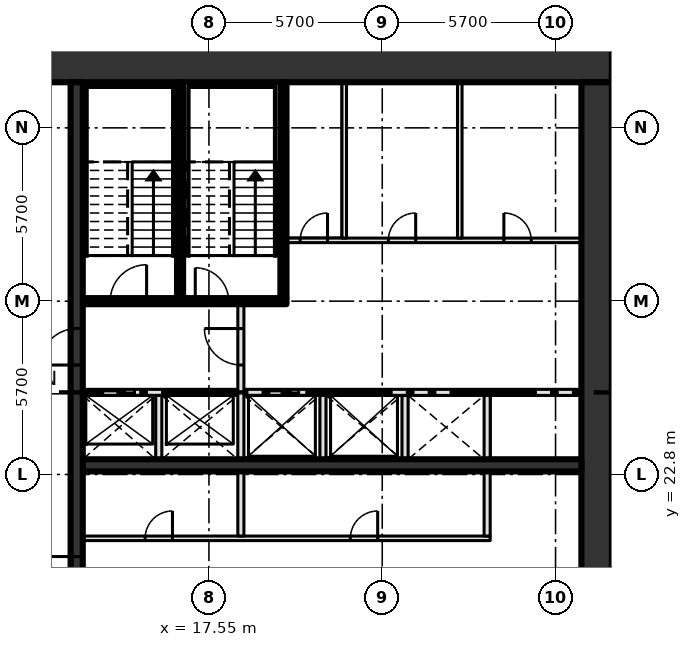
"""IFC4 building model, lengths in metres.
Left out: names, types, materials, properties, quantities, classifications, styles, units other than length and angle.
Written with IfcOpenShell. Run it as: python <this file> out.ifc"""

import sys

from ifc_helpers import new_model, si_unit, direction, frame, frame_2d, origin, place, context, subcontext, project, spatial, rectangle, extrude, element, fill, save


model = new_model("IFC4")
c1 = context("Model", 3, precision=1e-05, world=origin(), true_north=direction((0.0, 1.0)))
c2 = subcontext(c1, "Body", "Model", "MODEL_VIEW")
j1 = project(units=[si_unit("LENGTHUNIT", "METRE"), si_unit("PLANEANGLEUNIT", "RADIAN")], contexts=[c1])
p1 = place(None, origin())
s1 = spatial("IfcSite", under=j1, at=p1, CompositionType="ELEMENT")
p2 = place(p1, origin())
s2 = spatial("IfcBuilding", under=s1, at=p2, CompositionType="ELEMENT")
p3 = place(p2, frame((0.0, 0.0, 33.0)))
s3 = spatial("IfcBuildingStorey", under=s2, at=p3, CompositionType="ELEMENT", Elevation=33.0)
p4 = place(p3, frame((8.0, 36.3, -0.45), z_axis=(0.0, 0.0, 1.0), x_axis=(1.0, 0.0, 0.0)))
e1 = element("IfcWall", 1, at=p4, inside=s3, PredefinedType="SHEAR", context=c2, shape_type="SweptSolid", body=[
    extrude(rectangle(XDim=22.8, YDim=1.2, at=frame_2d((11.4, 0.0))), origin(), (0.0, 0.0, 1.0), 4.35),
])
p5 = place(p4, frame((2.3, 0.0, 0.45)))
e2 = element("IfcOpeningElement", 2, at=p5, cuts=e1, PredefinedType="OPENING", context=c2, shape_type="SweptSolid", body=[
    extrude(rectangle(XDim=1.8, YDim=2.1, at=frame_2d((0.9, 1.05))), frame((0.0, 0.61, 0.0), z_axis=(0.0, -1.0, 0.0), x_axis=(1.0, 0.0, 0.0)), (0.0, 0.0, 1.0), 1.22),
])
p6 = place(p3, frame((30.3, 15.1, -0.45), z_axis=(0.0, 0.0, 1.0), x_axis=(0.0, 1.0, 0.0)))
e3 = element("IfcWall", 3, at=p6, inside=s3, PredefinedType="SHEAR", context=c2, shape_type="SweptSolid", body=[
    extrude(rectangle(XDim=20.6, YDim=1.0, at=frame_2d((10.3, 0.0))), origin(), (0.0, 0.0, 1.0), 4.35),
])
p7 = place(p3, frame((13.4, 20.7, 0.0), z_axis=(0.0, 0.0, 1.0), x_axis=(1.0, 0.0, 0.0)))
e4 = element("IfcWall", 4, at=p7, inside=s3, PredefinedType="PARTITIONING", context=c2, shape_type="SweptSolid", body=[
    extrude(rectangle(XDim=13.4, YDim=0.15, at=frame_2d((6.7, 0.0))), origin(), (0.0, 0.0, 1.0), 3.9),
])
p8 = place(p7, frame((2.05, 0.0, 0.0)))
e5 = element("IfcOpeningElement", 5, at=p8, cuts=e4, PredefinedType="OPENING", context=c2, shape_type="SweptSolid", body=[
    extrude(rectangle(XDim=0.9, YDim=2.1, at=frame_2d((0.45, 1.05))), frame((0.0, 0.085, 0.0), z_axis=(0.0, -1.0, 0.0), x_axis=(1.0, 0.0, 0.0)), (0.0, 0.0, 1.0), 0.17),
])
p9 = place(p7, frame((8.8, 0.0, 0.0)))
e6 = element("IfcOpeningElement", 6, at=p9, cuts=e4, PredefinedType="OPENING", context=c2, shape_type="SweptSolid", body=[
    extrude(rectangle(XDim=0.9, YDim=2.1, at=frame_2d((0.45, 1.05))), frame((0.0, 0.085, 0.0), z_axis=(0.0, -1.0, 0.0), x_axis=(1.0, 0.0, 0.0)), (0.0, 0.0, 1.0), 0.17),
])
p10 = place(p3, frame((13.4, 23.1, 0.0), z_axis=(0.0, 0.0, 1.0), x_axis=(1.0, 0.0, 0.0)))
e7 = element("IfcWall", 7, at=p10, inside=s3, PredefinedType="SHEAR", context=c2, shape_type="SweptSolid", body=[
    extrude(rectangle(XDim=16.4, YDim=0.4, at=frame_2d((8.2, 0.0))), origin(), (0.0, 0.0, 1.0), 3.9),
])
p11 = place(p3, frame((13.4, 25.5, 0.0), z_axis=(0.0, 0.0, 1.0), x_axis=(1.0, 0.0, 0.0)))
e8 = element("IfcWall", 8, at=p11, inside=s3, PredefinedType="SOLIDWALL", context=c2, shape_type="SweptSolid", body=[
    extrude(rectangle(XDim=16.4, YDim=0.2, at=frame_2d((8.2, 0.0))), origin(), (0.0, 0.0, 1.0), 3.9),
])
p12 = place(p11, frame((0.6, 0.0, 0.0)))
e9 = element("IfcOpeningElement", 9, at=p12, cuts=e8, PredefinedType="OPENING", context=c2, shape_type="SweptSolid", body=[
    extrude(rectangle(XDim=1.1, YDim=2.1, at=frame_2d((0.55, 1.05))), frame((0.0, 0.11, 0.0), z_axis=(0.0, -1.0, 0.0), x_axis=(1.0, 0.0, 0.0)), (0.0, 0.0, 1.0), 0.22),
])
p13 = place(p11, frame((3.3, 0.0, 0.0)))
e10 = element("IfcOpeningElement", 10, at=p13, cuts=e8, PredefinedType="OPENING", context=c2, shape_type="SweptSolid", body=[
    extrude(rectangle(XDim=1.1, YDim=2.1, at=frame_2d((0.55, 1.05))), frame((0.0, 0.11, 0.0), z_axis=(0.0, -1.0, 0.0), x_axis=(1.0, 0.0, 0.0)), (0.0, 0.0, 1.0), 0.22),
])
p14 = place(p11, frame((6.0, 0.0, 0.0)))
e11 = element("IfcOpeningElement", 11, at=p14, cuts=e8, PredefinedType="OPENING", context=c2, shape_type="SweptSolid", body=[
    extrude(rectangle(XDim=1.1, YDim=2.1, at=frame_2d((0.55, 1.05))), frame((0.0, 0.11, 0.0), z_axis=(0.0, -1.0, 0.0), x_axis=(1.0, 0.0, 0.0)), (0.0, 0.0, 1.0), 0.22),
])
p15 = place(p11, frame((8.7, 0.0, 0.0)))
e12 = element("IfcOpeningElement", 12, at=p15, cuts=e8, PredefinedType="OPENING", context=c2, shape_type="SweptSolid", body=[
    extrude(rectangle(XDim=1.1, YDim=2.1, at=frame_2d((0.55, 1.05))), frame((0.0, 0.11, 0.0), z_axis=(0.0, -1.0, 0.0), x_axis=(1.0, 0.0, 0.0)), (0.0, 0.0, 1.0), 0.22),
])
p16 = place(p3, frame((13.4, 28.5, 0.0), z_axis=(0.0, 0.0, 1.0), x_axis=(1.0, 0.0, 0.0)))
e13 = element("IfcWall", 13, at=p16, inside=s3, PredefinedType="SOLIDWALL", context=c2, shape_type="SweptSolid", body=[
    extrude(rectangle(XDim=6.7, YDim=0.2, at=frame_2d((3.35, 0.0))), origin(), (0.0, 0.0, 1.0), 3.9),
])
p17 = place(p16, frame((0.9, 0.0, 0.0)))
e14 = element("IfcOpeningElement", 14, at=p17, cuts=e13, PredefinedType="OPENING", context=c2, shape_type="SweptSolid", body=[
    extrude(rectangle(XDim=1.2, YDim=2.1, at=frame_2d((0.6, 1.05))), frame((0.0, 0.11, 0.0), z_axis=(0.0, -1.0, 0.0), x_axis=(1.0, 0.0, 0.0)), (0.0, 0.0, 1.0), 0.22),
])
p18 = place(p16, frame((3.7, 0.0, 0.0)))
e15 = element("IfcOpeningElement", 15, at=p18, cuts=e13, PredefinedType="OPENING", context=c2, shape_type="SweptSolid", body=[
    extrude(rectangle(XDim=1.1, YDim=2.1, at=frame_2d((0.55, 1.05))), frame((0.0, 0.11, 0.0), z_axis=(0.0, -1.0, 0.0), x_axis=(1.0, 0.0, 0.0)), (0.0, 0.0, 1.0), 0.22),
])
p19 = place(p3, frame((20.1, 30.5, 0.0), z_axis=(0.0, 0.0, 1.0), x_axis=(1.0, 0.0, 0.0)))
e16 = element("IfcWall", 16, at=p19, inside=s3, PredefinedType="PARTITIONING", context=c2, shape_type="SweptSolid", body=[
    extrude(rectangle(XDim=9.7, YDim=0.15, at=frame_2d((4.85, 0.0))), origin(), (0.0, 0.0, 1.0), 3.9),
])
p20 = place(p19, frame((0.45, 0.0, 0.0)))
e17 = element("IfcOpeningElement", 17, at=p20, cuts=e16, PredefinedType="OPENING", context=c2, shape_type="SweptSolid", body=[
    extrude(rectangle(XDim=0.9, YDim=2.1, at=frame_2d((0.45, 1.05))), frame((0.0, 0.085, 0.0), z_axis=(0.0, -1.0, 0.0), x_axis=(1.0, 0.0, 0.0)), (0.0, 0.0, 1.0), 0.17),
])
p21 = place(p19, frame((3.35, 0.0, 0.0)))
e18 = element("IfcOpeningElement", 18, at=p21, cuts=e16, PredefinedType="OPENING", context=c2, shape_type="SweptSolid", body=[
    extrude(rectangle(XDim=0.9, YDim=2.1, at=frame_2d((0.45, 1.05))), frame((0.0, 0.085, 0.0), z_axis=(0.0, -1.0, 0.0), x_axis=(1.0, 0.0, 0.0)), (0.0, 0.0, 1.0), 0.17),
])
p22 = place(p19, frame((7.15, 0.0, 0.0)))
e19 = element("IfcOpeningElement", 19, at=p22, cuts=e16, PredefinedType="OPENING", context=c2, shape_type="SweptSolid", body=[
    extrude(rectangle(XDim=0.9, YDim=2.1, at=frame_2d((0.45, 1.05))), frame((0.0, 0.085, 0.0), z_axis=(0.0, -1.0, 0.0), x_axis=(1.0, 0.0, 0.0)), (0.0, 0.0, 1.0), 0.17),
])
p23 = place(p3, frame((13.2, 15.1, 0.0), z_axis=(0.0, 0.0, 1.0), x_axis=(0.0, 1.0, 0.0)))
e20 = element("IfcWall", 20, at=p23, inside=s3, PredefinedType="SHEAR", context=c2, shape_type="SweptSolid", body=[
    extrude(rectangle(XDim=20.6, YDim=0.4, at=frame_2d((10.3, 0.0))), origin(), (0.0, 0.0, 1.0), 3.9),
])
p24 = place(p23, frame((3.2, 0.0, 0.0)))
e21 = element("IfcOpeningElement", 21, at=p24, cuts=e20, PredefinedType="OPENING", context=c2, shape_type="SweptSolid", body=[
    extrude(rectangle(XDim=1.8, YDim=2.1, at=frame_2d((0.9, 1.05))), frame((0.0, 0.21, 0.0), z_axis=(0.0, -1.0, 0.0), x_axis=(1.0, 0.0, 0.0)), (0.0, 0.0, 1.0), 0.42),
])
p25 = place(p23, frame((11.3, 0.0, 0.0)))
e22 = element("IfcOpeningElement", 22, at=p25, cuts=e20, PredefinedType="OPENING", context=c2, shape_type="SweptSolid", body=[
    extrude(rectangle(XDim=1.2, YDim=2.1, at=frame_2d((0.6, 1.05))), frame((0.0, 0.21, 0.0), z_axis=(0.0, -1.0, 0.0), x_axis=(1.0, 0.0, 0.0)), (0.0, 0.0, 1.0), 0.42),
])
p26 = place(p3, frame((15.9, 23.3, 0.0), z_axis=(0.0, 0.0, 1.0), x_axis=(0.0, 1.0, 0.0)))
e23 = element("IfcWall", 23, at=p26, inside=s3, PredefinedType="SOLIDWALL", context=c2, shape_type="SweptSolid", body=[
    extrude(rectangle(XDim=2.1, YDim=0.2, at=frame_2d((1.05, 0.0))), origin(), (0.0, 0.0, 1.0), 3.9),
])
p27 = place(p3, frame((16.6, 28.6, 0.0), z_axis=(0.0, 0.0, 1.0), x_axis=(0.0, 1.0, 0.0)))
e24 = element("IfcWall", 24, at=p27, inside=s3, PredefinedType="SOLIDWALL", context=c2, shape_type="SweptSolid", body=[
    extrude(rectangle(XDim=7.1, YDim=0.2, at=frame_2d((3.55, 0.0))), origin(), (0.0, 0.0, 1.0), 3.9),
])
p28 = place(p3, frame((18.6, 20.775, 0.0), z_axis=(0.0, 0.0, 1.0), x_axis=(0.0, 1.0, 0.0)))
e25 = element("IfcWall", 25, at=p28, inside=s3, PredefinedType="SOLIDWALL", context=c2, shape_type="SweptSolid", body=[
    extrude(rectangle(XDim=7.625, YDim=0.2, at=frame_2d((3.812, 0.0))), origin(), (0.0, 0.0, 1.0), 3.9),
])
p29 = place(p28, frame((5.625, 0.0, 0.0)))
e26 = element("IfcOpeningElement", 26, at=p29, cuts=e25, PredefinedType="OPENING", context=c2, shape_type="SweptSolid", body=[
    extrude(rectangle(XDim=1.2, YDim=2.1, at=frame_2d((0.6, 1.05))), frame((0.0, 0.11, 0.0), z_axis=(0.0, -1.0, 0.0), x_axis=(1.0, 0.0, 0.0)), (0.0, 0.0, 1.0), 0.22),
])
p30 = place(p3, frame((20.0, 28.6, 0.0), z_axis=(0.0, 0.0, 1.0), x_axis=(0.0, 1.0, 0.0)))
e27 = element("IfcWall", 27, at=p30, inside=s3, PredefinedType="SOLIDWALL", context=c2, shape_type="SweptSolid", body=[
    extrude(rectangle(XDim=7.1, YDim=0.2, at=frame_2d((3.55, 0.0))), origin(), (0.0, 0.0, 1.0), 3.9),
])
p31 = place(p3, frame((21.3, 23.3, 0.0), z_axis=(0.0, 0.0, 1.0), x_axis=(0.0, 1.0, 0.0)))
e28 = element("IfcWall", 28, at=p31, inside=s3, PredefinedType="SOLIDWALL", context=c2, shape_type="SweptSolid", body=[
    extrude(rectangle(XDim=2.1, YDim=0.2, at=frame_2d((1.05, 0.0))), origin(), (0.0, 0.0, 1.0), 3.9),
])
p32 = place(p3, frame((22.0, 30.575, 0.0), z_axis=(0.0, 0.0, 1.0), x_axis=(0.0, 1.0, 0.0)))
e29 = element("IfcWall", 29, at=p32, inside=s3, PredefinedType="PARTITIONING", context=c2, shape_type="SweptSolid", body=[
    extrude(rectangle(XDim=5.125, YDim=0.15, at=frame_2d((2.562, 0.0))), origin(), (0.0, 0.0, 1.0), 3.9),
])
p33 = place(p3, frame((24.0, 23.3, 0.0), z_axis=(0.0, 0.0, 1.0), x_axis=(0.0, 1.0, 0.0)))
e30 = element("IfcWall", 30, at=p33, inside=s3, PredefinedType="SOLIDWALL", context=c2, shape_type="SweptSolid", body=[
    extrude(rectangle(XDim=2.1, YDim=0.2, at=frame_2d((1.05, 0.0))), origin(), (0.0, 0.0, 1.0), 3.9),
])
p34 = place(p3, frame((25.8, 30.575, 0.0), z_axis=(0.0, 0.0, 1.0), x_axis=(0.0, 1.0, 0.0)))
e31 = element("IfcWall", 31, at=p34, inside=s3, PredefinedType="PARTITIONING", context=c2, shape_type="SweptSolid", body=[
    extrude(rectangle(XDim=5.125, YDim=0.15, at=frame_2d((2.562, 0.0))), origin(), (0.0, 0.0, 1.0), 3.9),
])
p35 = place(p3, frame((26.7, 20.775, 0.0), z_axis=(0.0, 0.0, 1.0), x_axis=(0.0, 1.0, 0.0)))
e32 = element("IfcWall", 32, at=p35, inside=s3, PredefinedType="SOLIDWALL", context=c2, shape_type="SweptSolid", body=[
    extrude(rectangle(XDim=4.625, YDim=0.2, at=frame_2d((2.312, 0.0))), origin(), (0.0, 0.0, 1.0), 3.9),
])
p36 = place(p12, origin())
e33 = element("IfcDoor", 33, at=p36, inside=s3, OperationType="SLIDING_TO_LEFT", PredefinedType="DOOR", context=c2, shape_type="SweptSolid", body=[
    extrude(rectangle(XDim=1.1, YDim=2.1, at=frame_2d((0.55, 1.05))), frame((0.0, 0.025, 0.0), z_axis=(0.0, -1.0, 0.0), x_axis=(1.0, 0.0, 0.0)), (0.0, 0.0, 1.0), 0.05),
])
fill(e9, e33)
p37 = place(p13, origin())
e34 = element("IfcDoor", 34, at=p37, inside=s3, OperationType="SLIDING_TO_LEFT", PredefinedType="DOOR", context=c2, shape_type="SweptSolid", body=[
    extrude(rectangle(XDim=1.1, YDim=2.1, at=frame_2d((0.55, 1.05))), frame((0.0, 0.025, 0.0), z_axis=(0.0, -1.0, 0.0), x_axis=(1.0, 0.0, 0.0)), (0.0, 0.0, 1.0), 0.05),
])
fill(e10, e34)
p38 = place(p14, origin())
e35 = element("IfcDoor", 35, at=p38, inside=s3, OperationType="SLIDING_TO_LEFT", PredefinedType="DOOR", context=c2, shape_type="SweptSolid", body=[
    extrude(rectangle(XDim=1.1, YDim=2.1, at=frame_2d((0.55, 1.05))), frame((0.0, 0.025, 0.0), z_axis=(0.0, -1.0, 0.0), x_axis=(1.0, 0.0, 0.0)), (0.0, 0.0, 1.0), 0.05),
])
fill(e11, e35)
p39 = place(p15, origin())
e36 = element("IfcDoor", 36, at=p39, inside=s3, OperationType="SLIDING_TO_LEFT", PredefinedType="DOOR", context=c2, shape_type="SweptSolid", body=[
    extrude(rectangle(XDim=1.1, YDim=2.1, at=frame_2d((0.55, 1.05))), frame((0.0, 0.025, 0.0), z_axis=(0.0, -1.0, 0.0), x_axis=(1.0, 0.0, 0.0)), (0.0, 0.0, 1.0), 0.05),
])
fill(e12, e36)
p40 = place(p8, origin())
e37 = element("IfcDoor", 37, at=p40, inside=s3, OperationType="SINGLE_SWING_RIGHT", PredefinedType="DOOR", context=c2, shape_type="SweptSolid", body=[
    extrude(rectangle(XDim=0.9, YDim=2.1, at=frame_2d((0.45, 1.05))), frame((0.0, 0.025, 0.0), z_axis=(0.0, -1.0, 0.0), x_axis=(1.0, 0.0, 0.0)), (0.0, 0.0, 1.0), 0.05),
])
fill(e5, e37)
p41 = place(p9, origin())
e38 = element("IfcDoor", 38, at=p41, inside=s3, OperationType="SINGLE_SWING_RIGHT", PredefinedType="DOOR", context=c2, shape_type="SweptSolid", body=[
    extrude(rectangle(XDim=0.9, YDim=2.1, at=frame_2d((0.45, 1.05))), frame((0.0, 0.025, 0.0), z_axis=(0.0, -1.0, 0.0), x_axis=(1.0, 0.0, 0.0)), (0.0, 0.0, 1.0), 0.05),
])
fill(e6, e38)
p42 = place(p20, origin())
e39 = element("IfcDoor", 39, at=p42, inside=s3, OperationType="SINGLE_SWING_RIGHT", PredefinedType="DOOR", context=c2, shape_type="SweptSolid", body=[
    extrude(rectangle(XDim=0.9, YDim=2.1, at=frame_2d((0.45, 1.05))), frame((0.0, 0.025, 0.0), z_axis=(0.0, -1.0, 0.0), x_axis=(1.0, 0.0, 0.0)), (0.0, 0.0, 1.0), 0.05),
])
fill(e17, e39)
p43 = place(p21, origin())
e40 = element("IfcDoor", 40, at=p43, inside=s3, OperationType="SINGLE_SWING_RIGHT", PredefinedType="DOOR", context=c2, shape_type="SweptSolid", body=[
    extrude(rectangle(XDim=0.9, YDim=2.1, at=frame_2d((0.45, 1.05))), frame((0.0, 0.025, 0.0), z_axis=(0.0, -1.0, 0.0), x_axis=(1.0, 0.0, 0.0)), (0.0, 0.0, 1.0), 0.05),
])
fill(e18, e40)
p44 = place(p22, origin())
e41 = element("IfcDoor", 41, at=p44, inside=s3, OperationType="SINGLE_SWING_LEFT", PredefinedType="DOOR", context=c2, shape_type="SweptSolid", body=[
    extrude(rectangle(XDim=0.9, YDim=2.1, at=frame_2d((0.45, 1.05))), frame((0.0, 0.025, 0.0), z_axis=(0.0, -1.0, 0.0), x_axis=(1.0, 0.0, 0.0)), (0.0, 0.0, 1.0), 0.05),
])
fill(e19, e41)
p45 = place(p17, origin())
e42 = element("IfcDoor", 42, at=p45, inside=s3, OperationType="SINGLE_SWING_RIGHT", PredefinedType="DOOR", context=c2, shape_type="SweptSolid", body=[
    extrude(rectangle(XDim=1.2, YDim=2.1, at=frame_2d((0.6, 1.05))), frame((0.0, 0.025, 0.0), z_axis=(0.0, -1.0, 0.0), x_axis=(1.0, 0.0, 0.0)), (0.0, 0.0, 1.0), 0.05),
])
fill(e14, e42)
p46 = place(p18, origin())
e43 = element("IfcDoor", 43, at=p46, inside=s3, OperationType="SINGLE_SWING_LEFT", PredefinedType="DOOR", context=c2, shape_type="SweptSolid", body=[
    extrude(rectangle(XDim=1.1, YDim=2.1, at=frame_2d((0.55, 1.05))), frame((0.0, 0.025, 0.0), z_axis=(0.0, -1.0, 0.0), x_axis=(1.0, 0.0, 0.0)), (0.0, 0.0, 1.0), 0.05),
])
fill(e15, e43)
p47 = place(p24, origin())
e44 = element("IfcDoor", 44, at=p47, inside=s3, OperationType="DOUBLE_DOOR_SINGLE_SWING", PredefinedType="DOOR", context=c2, shape_type="SweptSolid", body=[
    extrude(rectangle(XDim=1.8, YDim=2.1, at=frame_2d((0.9, 1.05))), frame((0.0, 0.025, 0.0), z_axis=(0.0, -1.0, 0.0), x_axis=(1.0, 0.0, 0.0)), (0.0, 0.0, 1.0), 0.05),
])
fill(e21, e44)
p48 = place(p25, origin())
e45 = element("IfcDoor", 45, at=p48, inside=s3, OperationType="SINGLE_SWING_LEFT", PredefinedType="DOOR", context=c2, shape_type="SweptSolid", body=[
    extrude(rectangle(XDim=1.2, YDim=2.1, at=frame_2d((0.6, 1.05))), frame((0.0, 0.025, 0.0), z_axis=(0.0, -1.0, 0.0), x_axis=(1.0, 0.0, 0.0)), (0.0, 0.0, 1.0), 0.05),
])
fill(e22, e45)
p49 = place(p29, origin())
e46 = element("IfcDoor", 46, at=p49, inside=s3, OperationType="SINGLE_SWING_RIGHT", PredefinedType="DOOR", context=c2, shape_type="SweptSolid", body=[
    extrude(rectangle(XDim=1.2, YDim=2.1, at=frame_2d((0.6, 1.05))), frame((0.0, 0.025, 0.0), z_axis=(0.0, -1.0, 0.0), x_axis=(1.0, 0.0, 0.0)), (0.0, 0.0, 1.0), 0.05),
])
fill(e26, e46)
save(model, sys.argv[1])
